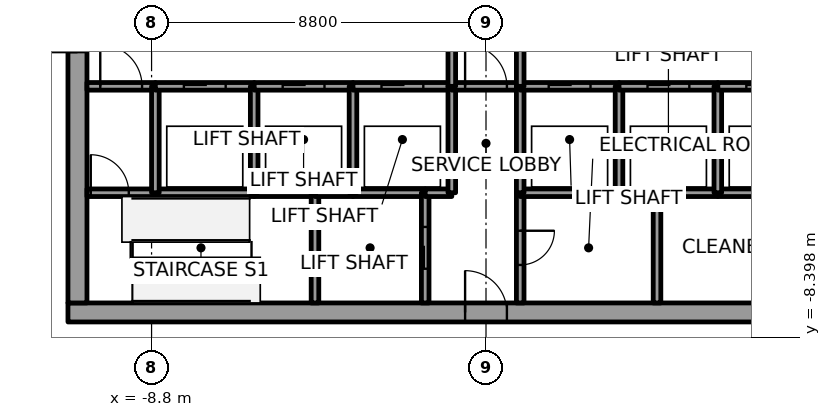
"""IFC4 building model, lengths in metres.
Left out: names, types, materials, properties, quantities, classifications, styles, units other than length and angle.
Written with IfcOpenShell. Run it as: python <this file> out.ifc"""

import sys

from ifc_helpers import new_model, si_unit, direction, frame, frame_2d, origin, place, context, subcontext, project, spatial, rectangle, extrude, element, fill, save


model = new_model("IFC4")
c1 = context("Model", 3, precision=1e-05, world=origin(), true_north=direction((0.0, 1.0)))
c2 = subcontext(c1, "Body", "Model", "MODEL_VIEW")
j1 = project(units=[si_unit("LENGTHUNIT", "METRE"), si_unit("PLANEANGLEUNIT", "RADIAN")], contexts=[c1])
p1 = place(None, origin())
s1 = spatial("IfcSite", under=j1, at=p1, CompositionType="ELEMENT")
p2 = place(p1, origin())
s2 = spatial("IfcBuilding", under=s1, at=p2, CompositionType="ELEMENT")
p3 = place(p2, frame((0.0, 0.0, 161.8)))
s3 = spatial("IfcBuildingStorey", under=s2, at=p3, CompositionType="ELEMENT", Elevation=161.8)
p4 = place(p3, frame((-11.0, -7.75, 0.0), z_axis=(0.0, 0.0, 1.0), x_axis=(1.0, 0.0, 0.0)))
e1 = element("IfcWall", 1, at=p4, inside=s3, PredefinedType="SHEAR", context=c2, shape_type="SweptSolid", body=[
    extrude(rectangle(XDim=22.0, YDim=0.5, at=frame_2d((11.0, 0.0))), origin(), (0.0, 0.0, 1.0), 4.0),
])
p5 = place(p4, frame((10.45, 0.0, 0.0)))
e2 = element("IfcOpeningElement", 2, at=p5, cuts=e1, PredefinedType="OPENING", context=c2, shape_type="SweptSolid", body=[
    extrude(rectangle(XDim=1.1, YDim=2.1, at=frame_2d((0.55, 1.05))), frame((0.0, 0.25, 0.0), z_axis=(0.0, -1.0, 0.0), x_axis=(1.0, 0.0, 0.0)), (0.0, 0.0, 1.0), 0.5),
])
p6 = place(p3, frame((-10.75, -7.5, 0.0), z_axis=(0.0, 0.0, 1.0), x_axis=(0.0, 1.0, 0.0)))
e3 = element("IfcWall", 3, at=p6, inside=s3, PredefinedType="SHEAR", context=c2, shape_type="SweptSolid", body=[
    extrude(rectangle(XDim=15.0, YDim=0.5, at=frame_2d((7.5, 0.0))), origin(), (0.0, 0.0, 1.0), 4.0),
])
p7 = place(p6, frame((6.6, 0.0, 0.0)))
e4 = element("IfcOpeningElement", 4, at=p7, cuts=e3, PredefinedType="OPENING", context=c2, shape_type="SweptSolid", body=[
    extrude(rectangle(XDim=1.8, YDim=2.1, at=frame_2d((0.9, 1.05))), frame((0.0, 0.25, 0.0), z_axis=(0.0, -1.0, 0.0), x_axis=(1.0, 0.0, 0.0)), (0.0, 0.0, 1.0), 0.5),
])
p8 = place(p3, frame((-10.5, -4.6, 0.0), z_axis=(0.0, 0.0, 1.0), x_axis=(1.0, 0.0, 0.0)))
e5 = element("IfcWall", 5, at=p8, inside=s3, PredefinedType="SOLIDWALL", context=c2, shape_type="SweptSolid", body=[
    extrude(rectangle(XDim=1.8, YDim=0.2, at=frame_2d((0.9, 0.0))), origin(), (0.0, 0.0, 1.0), 3.85),
])
p9 = place(p8, frame((0.1, 0.0, 0.0)))
e6 = element("IfcOpeningElement", 6, at=p9, cuts=e5, PredefinedType="OPENING", context=c2, shape_type="SweptSolid", body=[
    extrude(rectangle(XDim=1.0, YDim=2.1, at=frame_2d((0.5, 1.05))), frame((0.0, 0.1, 0.0), z_axis=(0.0, -1.0, 0.0), x_axis=(1.0, 0.0, 0.0)), (0.0, 0.0, 1.0), 0.2),
])
p10 = place(p3, frame((-10.5, -1.8, 0.0), z_axis=(0.0, 0.0, 1.0), x_axis=(1.0, 0.0, 0.0)))
e7 = element("IfcWall", 7, at=p10, inside=s3, PredefinedType="SOLIDWALL", context=c2, shape_type="SweptSolid", body=[
    extrude(rectangle(XDim=1.8, YDim=0.2, at=frame_2d((0.9, 0.0))), origin(), (0.0, 0.0, 1.0), 3.85),
])
p11 = place(p10, frame((0.35, 0.0, 0.0)))
e8 = element("IfcOpeningElement", 8, at=p11, cuts=e7, PredefinedType="OPENING", context=c2, shape_type="SweptSolid", body=[
    extrude(rectangle(XDim=1.1, YDim=2.1, at=frame_2d((0.55, 1.05))), frame((0.0, 0.1, 0.0), z_axis=(0.0, -1.0, 0.0), x_axis=(1.0, 0.0, 0.0)), (0.0, 0.0, 1.0), 0.2),
])
p12 = place(p3, frame((-8.7, -4.6, 0.0), z_axis=(0.0, 0.0, 1.0), x_axis=(1.0, 0.0, 0.0)))
e9 = element("IfcWall", 9, at=p12, inside=s3, PredefinedType="SOLIDWALL", context=c2, shape_type="SweptSolid", body=[
    extrude(rectangle(XDim=2.6, YDim=0.2, at=frame_2d((1.3, 0.0))), origin(), (0.0, 0.0, 1.0), 3.85),
])
p13 = place(p3, frame((-8.7, -4.6, 0.0), z_axis=(0.0, 0.0, 1.0), x_axis=(0.0, 1.0, 0.0)))
e10 = element("IfcWall", 10, at=p13, inside=s3, PredefinedType="SOLIDWALL", context=c2, shape_type="SweptSolid", body=[
    extrude(rectangle(XDim=2.8, YDim=0.2, at=frame_2d((1.4, 0.0))), origin(), (0.0, 0.0, 1.0), 3.85),
])
p14 = place(p3, frame((-8.7, -1.8, 0.0), z_axis=(0.0, 0.0, 1.0), x_axis=(1.0, 0.0, 0.0)))
e11 = element("IfcWall", 11, at=p14, inside=s3, PredefinedType="SOLIDWALL", context=c2, shape_type="SweptSolid", body=[
    extrude(rectangle(XDim=2.6, YDim=0.2, at=frame_2d((1.3, 0.0))), origin(), (0.0, 0.0, 1.0), 3.85),
])
p15 = place(p14, frame((0.75, 0.0, 0.0)))
e12 = element("IfcOpeningElement", 12, at=p15, cuts=e11, PredefinedType="OPENING", context=c2, shape_type="SweptSolid", body=[
    extrude(rectangle(XDim=1.1, YDim=2.1, at=frame_2d((0.55, 1.05))), frame((0.0, 0.1, 0.0), z_axis=(0.0, -1.0, 0.0), x_axis=(1.0, 0.0, 0.0)), (0.0, 0.0, 1.0), 0.2),
])
p16 = place(p3, frame((-6.1, -4.6, 0.0), z_axis=(0.0, 0.0, 1.0), x_axis=(1.0, 0.0, 0.0)))
e13 = element("IfcWall", 13, at=p16, inside=s3, PredefinedType="SOLIDWALL", context=c2, shape_type="SweptSolid", body=[
    extrude(rectangle(XDim=1.6, YDim=0.2, at=frame_2d((0.8, 0.0))), origin(), (0.0, 0.0, 1.0), 3.85),
])
p17 = place(p3, frame((-6.1, -4.6, 0.0), z_axis=(0.0, 0.0, 1.0), x_axis=(0.0, 1.0, 0.0)))
e14 = element("IfcWall", 14, at=p17, inside=s3, PredefinedType="SOLIDWALL", context=c2, shape_type="SweptSolid", body=[
    extrude(rectangle(XDim=2.8, YDim=0.2, at=frame_2d((1.4, 0.0))), origin(), (0.0, 0.0, 1.0), 3.85),
])
p18 = place(p3, frame((-6.1, -1.8, 0.0), z_axis=(0.0, 0.0, 1.0), x_axis=(1.0, 0.0, 0.0)))
e15 = element("IfcWall", 15, at=p18, inside=s3, PredefinedType="SOLIDWALL", context=c2, shape_type="SweptSolid", body=[
    extrude(rectangle(XDim=2.6, YDim=0.2, at=frame_2d((1.3, 0.0))), origin(), (0.0, 0.0, 1.0), 3.85),
])
p19 = place(p18, frame((0.75, 0.0, 0.0)))
e16 = element("IfcOpeningElement", 16, at=p19, cuts=e15, PredefinedType="OPENING", context=c2, shape_type="SweptSolid", body=[
    extrude(rectangle(XDim=1.1, YDim=2.1, at=frame_2d((0.55, 1.05))), frame((0.0, 0.1, 0.0), z_axis=(0.0, -1.0, 0.0), x_axis=(1.0, 0.0, 0.0)), (0.0, 0.0, 1.0), 0.2),
])
p20 = place(p3, frame((-4.5, -4.6, 0.0), z_axis=(0.0, 0.0, 1.0), x_axis=(0.0, -1.0, 0.0)))
e17 = element("IfcWall", 17, at=p20, inside=s3, PredefinedType="SOLIDWALL", context=c2, shape_type="SweptSolid", body=[
    extrude(rectangle(XDim=2.9, YDim=0.2, at=frame_2d((1.45, 0.0))), origin(), (0.0, 0.0, 1.0), 3.85),
])
p21 = place(p3, frame((-4.5, -4.6, 0.0), z_axis=(0.0, 0.0, 1.0), x_axis=(1.0, 0.0, 0.0)))
e18 = element("IfcWall", 18, at=p21, inside=s3, PredefinedType="SOLIDWALL", context=c2, shape_type="SweptSolid", body=[
    extrude(rectangle(XDim=1.0, YDim=0.2, at=frame_2d((0.5, 0.0))), origin(), (0.0, 0.0, 1.0), 3.85),
])
p22 = place(p3, frame((-3.5, -4.6, 0.0), z_axis=(0.0, 0.0, 1.0), x_axis=(1.0, 0.0, 0.0)))
e19 = element("IfcWall", 19, at=p22, inside=s3, PredefinedType="SOLIDWALL", context=c2, shape_type="SweptSolid", body=[
    extrude(rectangle(XDim=1.9, YDim=0.2, at=frame_2d((0.95, 0.0))), origin(), (0.0, 0.0, 1.0), 3.85),
])
p23 = place(p3, frame((-3.5, -4.6, 0.0), z_axis=(0.0, 0.0, 1.0), x_axis=(0.0, 1.0, 0.0)))
e20 = element("IfcWall", 20, at=p23, inside=s3, PredefinedType="SOLIDWALL", context=c2, shape_type="SweptSolid", body=[
    extrude(rectangle(XDim=2.8, YDim=0.2, at=frame_2d((1.4, 0.0))), origin(), (0.0, 0.0, 1.0), 3.85),
])
p24 = place(p3, frame((-3.5, -1.8, 0.0), z_axis=(0.0, 0.0, 1.0), x_axis=(1.0, 0.0, 0.0)))
e21 = element("IfcWall", 21, at=p24, inside=s3, PredefinedType="SOLIDWALL", context=c2, shape_type="SweptSolid", body=[
    extrude(rectangle(XDim=2.6, YDim=0.2, at=frame_2d((1.3, 0.0))), origin(), (0.0, 0.0, 1.0), 3.85),
])
p25 = place(p24, frame((0.75, 0.0, 0.0)))
e22 = element("IfcOpeningElement", 22, at=p25, cuts=e21, PredefinedType="OPENING", context=c2, shape_type="SweptSolid", body=[
    extrude(rectangle(XDim=1.1, YDim=2.1, at=frame_2d((0.55, 1.05))), frame((0.0, 0.1, 0.0), z_axis=(0.0, -1.0, 0.0), x_axis=(1.0, 0.0, 0.0)), (0.0, 0.0, 1.0), 0.2),
])
p26 = place(p3, frame((-1.6, -7.5, 0.0), z_axis=(0.0, 0.0, 1.0), x_axis=(0.0, 1.0, 0.0)))
e23 = element("IfcWall", 23, at=p26, inside=s3, PredefinedType="SOLIDWALL", context=c2, shape_type="SweptSolid", body=[
    extrude(rectangle(XDim=2.9, YDim=0.2, at=frame_2d((1.45, 0.0))), origin(), (0.0, 0.0, 1.0), 3.85),
])
p27 = place(p26, frame((0.9, 0.0, 0.0)))
e24 = element("IfcOpeningElement", 24, at=p27, cuts=e23, PredefinedType="OPENING", context=c2, shape_type="SweptSolid", body=[
    extrude(rectangle(XDim=1.1, YDim=2.1, at=frame_2d((0.55, 1.05))), frame((0.0, 0.1, 0.0), z_axis=(0.0, -1.0, 0.0), x_axis=(1.0, 0.0, 0.0)), (0.0, 0.0, 1.0), 0.2),
])
p28 = place(p3, frame((-1.6, -4.6, 0.0), z_axis=(0.0, 0.0, 1.0), x_axis=(1.0, 0.0, 0.0)))
e25 = element("IfcWall", 25, at=p28, inside=s3, PredefinedType="SOLIDWALL", context=c2, shape_type="SweptSolid", body=[
    extrude(rectangle(XDim=0.7, YDim=0.2, at=frame_2d((0.35, 0.0))), origin(), (0.0, 0.0, 1.0), 3.85),
])
p29 = place(p3, frame((-0.9, -4.6, 0.0), z_axis=(0.0, 0.0, 1.0), x_axis=(0.0, 1.0, 0.0)))
e26 = element("IfcWall", 26, at=p29, inside=s3, PredefinedType="SOLIDWALL", context=c2, shape_type="SweptSolid", body=[
    extrude(rectangle(XDim=2.8, YDim=0.2, at=frame_2d((1.4, 0.0))), origin(), (0.0, 0.0, 1.0), 3.85),
])
p30 = place(p3, frame((-0.9, -1.8, 0.0), z_axis=(0.0, 0.0, 1.0), x_axis=(1.0, 0.0, 0.0)))
e27 = element("IfcWall", 27, at=p30, inside=s3, PredefinedType="SOLIDWALL", context=c2, shape_type="SweptSolid", body=[
    extrude(rectangle(XDim=1.8, YDim=0.2, at=frame_2d((0.9, 0.0))), origin(), (0.0, 0.0, 1.0), 3.85),
])
p31 = place(p30, frame((0.35, 0.0, 0.0)))
e28 = element("IfcOpeningElement", 28, at=p31, cuts=e27, PredefinedType="OPENING", context=c2, shape_type="SweptSolid", body=[
    extrude(rectangle(XDim=1.1, YDim=2.1, at=frame_2d((0.55, 1.05))), frame((0.0, 0.1, 0.0), z_axis=(0.0, -1.0, 0.0), x_axis=(1.0, 0.0, 0.0)), (0.0, 0.0, 1.0), 0.2),
])
p32 = place(p3, frame((-0.9, 1.8, 0.0), z_axis=(0.0, 0.0, 1.0), x_axis=(0.0, -1.0, 0.0)))
e29 = element("IfcWall", 29, at=p32, inside=s3, PredefinedType="SOLIDWALL", context=c2, shape_type="SweptSolid", body=[
    extrude(rectangle(XDim=3.6, YDim=0.2, at=frame_2d((1.8, 0.0))), origin(), (0.0, 0.0, 1.0), 3.85),
])
p33 = place(p32, frame((1.05, 0.0, 0.0)))
e30 = element("IfcOpeningElement", 30, at=p33, cuts=e29, PredefinedType="OPENING", context=c2, shape_type="SweptSolid", body=[
    extrude(rectangle(XDim=1.5, YDim=2.1, at=frame_2d((0.75, 1.05))), frame((0.0, 0.1, 0.0), z_axis=(0.0, -1.0, 0.0), x_axis=(1.0, 0.0, 0.0)), (0.0, 0.0, 1.0), 0.2),
])
p34 = place(p3, frame((0.9, -4.6, 0.0), z_axis=(0.0, 0.0, 1.0), x_axis=(0.0, -1.0, 0.0)))
e31 = element("IfcWall", 31, at=p34, inside=s3, PredefinedType="SOLIDWALL", context=c2, shape_type="SweptSolid", body=[
    extrude(rectangle(XDim=2.9, YDim=0.2, at=frame_2d((1.45, 0.0))), origin(), (0.0, 0.0, 1.0), 3.85),
])
p35 = place(p34, frame((1.0, 0.0, 0.0)))
e32 = element("IfcOpeningElement", 32, at=p35, cuts=e31, PredefinedType="OPENING", context=c2, shape_type="SweptSolid", body=[
    extrude(rectangle(XDim=0.9, YDim=2.1, at=frame_2d((0.45, 1.05))), frame((0.0, 0.1, 0.0), z_axis=(0.0, -1.0, 0.0), x_axis=(1.0, 0.0, 0.0)), (0.0, 0.0, 1.0), 0.2),
])
p36 = place(p3, frame((3.5, -4.6, 0.0), z_axis=(0.0, 0.0, 1.0), x_axis=(-1.0, 0.0, 0.0)))
e33 = element("IfcWall", 33, at=p36, inside=s3, PredefinedType="SOLIDWALL", context=c2, shape_type="SweptSolid", body=[
    extrude(rectangle(XDim=2.6, YDim=0.2, at=frame_2d((1.3, 0.0))), origin(), (0.0, 0.0, 1.0), 3.85),
])
p37 = place(p3, frame((0.9, -1.8, 0.0), z_axis=(0.0, 0.0, 1.0), x_axis=(0.0, -1.0, 0.0)))
e34 = element("IfcWall", 34, at=p37, inside=s3, PredefinedType="SOLIDWALL", context=c2, shape_type="SweptSolid", body=[
    extrude(rectangle(XDim=2.8, YDim=0.2, at=frame_2d((1.4, 0.0))), origin(), (0.0, 0.0, 1.0), 3.85),
])
p38 = place(p3, frame((0.9, -1.8, 0.0), z_axis=(0.0, 0.0, 1.0), x_axis=(1.0, 0.0, 0.0)))
e35 = element("IfcWall", 35, at=p38, inside=s3, PredefinedType="SOLIDWALL", context=c2, shape_type="SweptSolid", body=[
    extrude(rectangle(XDim=2.6, YDim=0.2, at=frame_2d((1.3, 0.0))), origin(), (0.0, 0.0, 1.0), 3.85),
])
p39 = place(p38, frame((0.75, 0.0, 0.0)))
e36 = element("IfcOpeningElement", 36, at=p39, cuts=e35, PredefinedType="OPENING", context=c2, shape_type="SweptSolid", body=[
    extrude(rectangle(XDim=1.1, YDim=2.1, at=frame_2d((0.55, 1.05))), frame((0.0, 0.1, 0.0), z_axis=(0.0, -1.0, 0.0), x_axis=(1.0, 0.0, 0.0)), (0.0, 0.0, 1.0), 0.2),
])
p40 = place(p3, frame((0.9, -1.8, 0.0), z_axis=(0.0, 0.0, 1.0), x_axis=(0.0, 1.0, 0.0)))
e37 = element("IfcWall", 37, at=p40, inside=s3, PredefinedType="SOLIDWALL", context=c2, shape_type="SweptSolid", body=[
    extrude(rectangle(XDim=3.6, YDim=0.2, at=frame_2d((1.8, 0.0))), origin(), (0.0, 0.0, 1.0), 3.85),
])
p41 = place(p40, frame((1.05, 0.0, 0.0)))
e38 = element("IfcOpeningElement", 38, at=p41, cuts=e37, PredefinedType="OPENING", context=c2, shape_type="SweptSolid", body=[
    extrude(rectangle(XDim=1.5, YDim=2.1, at=frame_2d((0.75, 1.05))), frame((0.0, 0.1, 0.0), z_axis=(0.0, -1.0, 0.0), x_axis=(1.0, 0.0, 0.0)), (0.0, 0.0, 1.0), 0.2),
])
p42 = place(p3, frame((4.5, -4.6, 0.0), z_axis=(0.0, 0.0, 1.0), x_axis=(-1.0, 0.0, 0.0)))
e39 = element("IfcWall", 39, at=p42, inside=s3, PredefinedType="SOLIDWALL", context=c2, shape_type="SweptSolid", body=[
    extrude(rectangle(XDim=1.0, YDim=0.2, at=frame_2d((0.5, 0.0))), origin(), (0.0, 0.0, 1.0), 3.85),
])
p43 = place(p3, frame((3.5, -4.6, 0.0), z_axis=(0.0, 0.0, 1.0), x_axis=(0.0, 1.0, 0.0)))
e40 = element("IfcWall", 40, at=p43, inside=s3, PredefinedType="SOLIDWALL", context=c2, shape_type="SweptSolid", body=[
    extrude(rectangle(XDim=2.8, YDim=0.2, at=frame_2d((1.4, 0.0))), origin(), (0.0, 0.0, 1.0), 3.85),
])
p44 = place(p3, frame((3.5, -1.8, 0.0), z_axis=(0.0, 0.0, 1.0), x_axis=(1.0, 0.0, 0.0)))
e41 = element("IfcWall", 41, at=p44, inside=s3, PredefinedType="SOLIDWALL", context=c2, shape_type="SweptSolid", body=[
    extrude(rectangle(XDim=2.6, YDim=0.2, at=frame_2d((1.3, 0.0))), origin(), (0.0, 0.0, 1.0), 3.85),
])
p45 = place(p44, frame((0.75, 0.0, 0.0)))
e42 = element("IfcOpeningElement", 42, at=p45, cuts=e41, PredefinedType="OPENING", context=c2, shape_type="SweptSolid", body=[
    extrude(rectangle(XDim=1.1, YDim=2.1, at=frame_2d((0.55, 1.05))), frame((0.0, 0.1, 0.0), z_axis=(0.0, -1.0, 0.0), x_axis=(1.0, 0.0, 0.0)), (0.0, 0.0, 1.0), 0.2),
])
p46 = place(p3, frame((4.5, -4.6, 0.0), z_axis=(0.0, 0.0, 1.0), x_axis=(0.0, -1.0, 0.0)))
e43 = element("IfcWall", 43, at=p46, inside=s3, PredefinedType="SOLIDWALL", context=c2, shape_type="SweptSolid", body=[
    extrude(rectangle(XDim=2.9, YDim=0.2, at=frame_2d((1.45, 0.0))), origin(), (0.0, 0.0, 1.0), 3.85),
])
p47 = place(p3, frame((6.1, -4.6, 0.0), z_axis=(0.0, 0.0, 1.0), x_axis=(-1.0, 0.0, 0.0)))
e44 = element("IfcWall", 44, at=p47, inside=s3, PredefinedType="SOLIDWALL", context=c2, shape_type="SweptSolid", body=[
    extrude(rectangle(XDim=1.6, YDim=0.2, at=frame_2d((0.8, 0.0))), origin(), (0.0, 0.0, 1.0), 3.85),
])
p48 = place(p3, frame((8.7, -4.6, 0.0), z_axis=(0.0, 0.0, 1.0), x_axis=(-1.0, 0.0, 0.0)))
e45 = element("IfcWall", 45, at=p48, inside=s3, PredefinedType="SOLIDWALL", context=c2, shape_type="SweptSolid", body=[
    extrude(rectangle(XDim=2.6, YDim=0.2, at=frame_2d((1.3, 0.0))), origin(), (0.0, 0.0, 1.0), 3.85),
])
p49 = place(p3, frame((6.1, -4.6, 0.0), z_axis=(0.0, 0.0, 1.0), x_axis=(0.0, 1.0, 0.0)))
e46 = element("IfcWall", 46, at=p49, inside=s3, PredefinedType="SOLIDWALL", context=c2, shape_type="SweptSolid", body=[
    extrude(rectangle(XDim=2.8, YDim=0.2, at=frame_2d((1.4, 0.0))), origin(), (0.0, 0.0, 1.0), 3.85),
])
p50 = place(p3, frame((6.1, -1.8, 0.0), z_axis=(0.0, 0.0, 1.0), x_axis=(1.0, 0.0, 0.0)))
e47 = element("IfcWall", 47, at=p50, inside=s3, PredefinedType="SOLIDWALL", context=c2, shape_type="SweptSolid", body=[
    extrude(rectangle(XDim=2.6, YDim=0.2, at=frame_2d((1.3, 0.0))), origin(), (0.0, 0.0, 1.0), 3.85),
])
p51 = place(p50, frame((0.75, 0.0, 0.0)))
e48 = element("IfcOpeningElement", 48, at=p51, cuts=e47, PredefinedType="OPENING", context=c2, shape_type="SweptSolid", body=[
    extrude(rectangle(XDim=1.1, YDim=2.1, at=frame_2d((0.55, 1.05))), frame((0.0, 0.1, 0.0), z_axis=(0.0, -1.0, 0.0), x_axis=(1.0, 0.0, 0.0)), (0.0, 0.0, 1.0), 0.2),
])
p52 = place(p15, origin())
e49 = element("IfcDoor", 49, at=p52, inside=s3, OperationType="SLIDING_TO_RIGHT", PredefinedType="DOOR", context=c2, shape_type="SweptSolid", body=[
    extrude(rectangle(XDim=1.1, YDim=2.1, at=frame_2d((0.55, 1.05))), frame((0.0, 0.025, 0.0), z_axis=(0.0, -1.0, 0.0), x_axis=(1.0, 0.0, 0.0)), (0.0, 0.0, 1.0), 0.05),
])
fill(e12, e49)
p53 = place(p19, origin())
e50 = element("IfcDoor", 50, at=p53, inside=s3, OperationType="SLIDING_TO_LEFT", PredefinedType="DOOR", context=c2, shape_type="SweptSolid", body=[
    extrude(rectangle(XDim=1.1, YDim=2.1, at=frame_2d((0.55, 1.05))), frame((0.0, 0.025, 0.0), z_axis=(0.0, -1.0, 0.0), x_axis=(1.0, 0.0, 0.0)), (0.0, 0.0, 1.0), 0.05),
])
fill(e16, e50)
p54 = place(p25, origin())
e51 = element("IfcDoor", 51, at=p54, inside=s3, OperationType="SLIDING_TO_RIGHT", PredefinedType="DOOR", context=c2, shape_type="SweptSolid", body=[
    extrude(rectangle(XDim=1.1, YDim=2.1, at=frame_2d((0.55, 1.05))), frame((0.0, 0.025, 0.0), z_axis=(0.0, -1.0, 0.0), x_axis=(1.0, 0.0, 0.0)), (0.0, 0.0, 1.0), 0.05),
])
fill(e22, e51)
p55 = place(p39, origin())
e52 = element("IfcDoor", 52, at=p55, inside=s3, OperationType="SLIDING_TO_RIGHT", PredefinedType="DOOR", context=c2, shape_type="SweptSolid", body=[
    extrude(rectangle(XDim=1.1, YDim=2.1, at=frame_2d((0.55, 1.05))), frame((0.0, 0.025, 0.0), z_axis=(0.0, -1.0, 0.0), x_axis=(1.0, 0.0, 0.0)), (0.0, 0.0, 1.0), 0.05),
])
fill(e36, e52)
p56 = place(p45, origin())
e53 = element("IfcDoor", 53, at=p56, inside=s3, OperationType="SLIDING_TO_LEFT", PredefinedType="DOOR", context=c2, shape_type="SweptSolid", body=[
    extrude(rectangle(XDim=1.1, YDim=2.1, at=frame_2d((0.55, 1.05))), frame((0.0, 0.025, 0.0), z_axis=(0.0, -1.0, 0.0), x_axis=(1.0, 0.0, 0.0)), (0.0, 0.0, 1.0), 0.05),
])
fill(e42, e53)
p57 = place(p51, origin())
e54 = element("IfcDoor", 54, at=p57, inside=s3, OperationType="SLIDING_TO_RIGHT", PredefinedType="DOOR", context=c2, shape_type="SweptSolid", body=[
    extrude(rectangle(XDim=1.1, YDim=2.1, at=frame_2d((0.55, 1.05))), frame((0.0, 0.025, 0.0), z_axis=(0.0, -1.0, 0.0), x_axis=(1.0, 0.0, 0.0)), (0.0, 0.0, 1.0), 0.05),
])
fill(e48, e54)
p58 = place(p27, origin())
e55 = element("IfcDoor", 55, at=p58, inside=s3, OperationType="SLIDING_TO_RIGHT", PredefinedType="DOOR", context=c2, shape_type="SweptSolid", body=[
    extrude(rectangle(XDim=1.1, YDim=2.1, at=frame_2d((0.55, 1.05))), frame((0.0, 0.025, 0.0), z_axis=(0.0, -1.0, 0.0), x_axis=(1.0, 0.0, 0.0)), (0.0, 0.0, 1.0), 0.05),
])
fill(e24, e55)
p59 = place(p11, origin())
e56 = element("IfcDoor", 56, at=p59, inside=s3, OperationType="SINGLE_SWING_RIGHT", PredefinedType="DOOR", context=c2, shape_type="SweptSolid", body=[
    extrude(rectangle(XDim=1.1, YDim=2.1, at=frame_2d((0.55, 1.05))), frame((0.0, 0.025, 0.0), z_axis=(0.0, -1.0, 0.0), x_axis=(1.0, 0.0, 0.0)), (0.0, 0.0, 1.0), 0.05),
])
fill(e8, e56)
p60 = place(p31, origin())
e57 = element("IfcDoor", 57, at=p60, inside=s3, OperationType="SINGLE_SWING_LEFT", PredefinedType="DOOR", context=c2, shape_type="SweptSolid", body=[
    extrude(rectangle(XDim=1.1, YDim=2.1, at=frame_2d((0.55, 1.05))), frame((0.0, 0.025, 0.0), z_axis=(0.0, -1.0, 0.0), x_axis=(1.0, 0.0, 0.0)), (0.0, 0.0, 1.0), 0.05),
])
fill(e28, e57)
p61 = place(p9, origin())
e58 = element("IfcDoor", 58, at=p61, inside=s3, OperationType="SINGLE_SWING_LEFT", PredefinedType="DOOR", context=c2, shape_type="SweptSolid", body=[
    extrude(rectangle(XDim=1.0, YDim=2.1, at=frame_2d((0.5, 1.05))), frame((0.0, 0.025, 0.0), z_axis=(0.0, -1.0, 0.0), x_axis=(1.0, 0.0, 0.0)), (0.0, 0.0, 1.0), 0.05),
])
fill(e6, e58)
p62 = place(p35, origin())
e59 = element("IfcDoor", 59, at=p62, inside=s3, OperationType="SINGLE_SWING_RIGHT", PredefinedType="DOOR", context=c2, shape_type="SweptSolid", body=[
    extrude(rectangle(XDim=0.9, YDim=2.1, at=frame_2d((0.45, 1.05))), frame((0.0, 0.025, 0.0), z_axis=(0.0, -1.0, 0.0), x_axis=(1.0, 0.0, 0.0)), (0.0, 0.0, 1.0), 0.05),
])
fill(e32, e59)
p63 = place(p7, origin())
e60 = element("IfcDoor", 60, at=p63, inside=s3, OperationType="DOUBLE_DOOR_SINGLE_SWING", PredefinedType="DOOR", context=c2, shape_type="SweptSolid", body=[
    extrude(rectangle(XDim=1.8, YDim=2.1, at=frame_2d((0.9, 1.05))), frame((0.0, 0.025, 0.0), z_axis=(0.0, -1.0, 0.0), x_axis=(1.0, 0.0, 0.0)), (0.0, 0.0, 1.0), 0.05),
])
fill(e4, e60)
p64 = place(p5, origin())
e61 = element("IfcDoor", 61, at=p64, inside=s3, OperationType="SINGLE_SWING_RIGHT", PredefinedType="DOOR", context=c2, shape_type="SweptSolid", body=[
    extrude(rectangle(XDim=1.1, YDim=2.1, at=frame_2d((0.55, 1.05))), frame((0.0, 0.025, 0.0), z_axis=(0.0, -1.0, 0.0), x_axis=(1.0, 0.0, 0.0)), (0.0, 0.0, 1.0), 0.05),
])
fill(e2, e61)
save(model, sys.argv[1])
